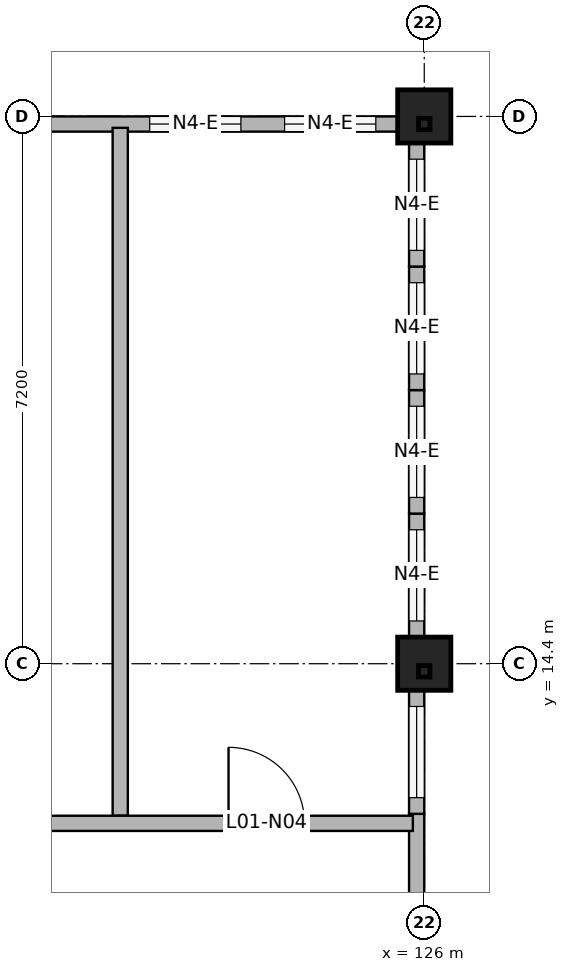
"""IFC4 building model, lengths in metres.
Left out: names, types, materials, properties, quantities, classifications, styles, units other than length and angle.
Written with IfcOpenShell. Run it as: python <this file> out.ifc"""

import sys

from ifc_helpers import new_model, si_unit, direction, frame, frame_2d, origin, origin_2d, place, context, subcontext, project, spatial, rectangle, hollow_rectangle, extrude, element, fill, save


model = new_model("IFC4")
c1 = context("Model", 3, precision=1e-05, world=origin(), true_north=direction((0.0, 1.0)))
c2 = subcontext(c1, "Body", "Model", "MODEL_VIEW")
j1 = project(units=[si_unit("LENGTHUNIT", "METRE"), si_unit("PLANEANGLEUNIT", "RADIAN")], contexts=[c1])
p1 = place(None, origin())
s1 = spatial("IfcSite", under=j1, at=p1, CompositionType="ELEMENT")
p2 = place(p1, origin())
s2 = spatial("IfcBuilding", under=s1, at=p2, CompositionType="ELEMENT")
p3 = place(p2, frame((0.0, 0.0, 4.2)))
s3 = spatial("IfcBuildingStorey", under=s2, at=p3, CompositionType="ELEMENT", Elevation=4.2)
for number, where, z_axis, x_axis in (
    (1, (126.0, 14.4, 0.0), (0.0, 0.0, 1.0), (1.0, 0.0, 0.0)),
    (2, (126.0, 21.6, 0.0), (0.0, 0.0, 1.0), (1.0, 0.0, 0.0)),
):
    element("IfcColumn", number, at=place(p3, frame(where, z_axis=z_axis, x_axis=x_axis)), inside=s3, PredefinedType="COLUMN", context=c2, shape_type="SweptSolid", body=[
        extrude(rectangle(XDim=0.7, YDim=0.7, at=origin_2d()), origin(), (0.0, 0.0, 1.0), 4.004),
    ])
for number, where, z_axis, x_axis in (
    (3, (126.0, 14.3, 4.004), (0.0, 0.0, 1.0), (1.0, 0.0, 0.0)),
    (4, (126.0, 21.5, 4.004), (0.0, 0.0, 1.0), (1.0, 0.0, 0.0)),
):
    element("IfcColumn", number, at=place(p3, frame(where, z_axis=z_axis, x_axis=x_axis)), inside=s3, PredefinedType="COLUMN", context=c2, shape_type="SweptSolid", body=[
        extrude(hollow_rectangle(XDim=0.15, YDim=0.15, WallThickness=0.008, at=origin_2d()), origin(), (0.0, 0.0, 1.0), 1.155),
    ])
p4 = place(p3, frame((120.35, 21.5, 0.0), z_axis=(0.0, 0.0, 1.0), x_axis=(1.0, 0.0, 0.0)))
e5 = element("IfcWall", 5, at=p4, inside=s3, PredefinedType="SOLIDWALL", context=c2, shape_type="SweptSolid", body=[
    extrude(rectangle(XDim=5.3, YDim=0.2, at=frame_2d((2.65, 0.0))), origin(), (0.0, 0.0, 1.0), 3.204),
])
p5 = place(p4, frame((2.038, 0.0, 1.2)))
e6 = element("IfcOpeningElement", 6, at=p5, cuts=e5, PredefinedType="OPENING", context=c2, shape_type="SweptSolid", body=[
    extrude(rectangle(XDim=1.2, YDim=1.4, at=frame_2d((0.6, 0.7))), frame((0.0, 0.11, 0.0), z_axis=(0.0, -1.0, 0.0), x_axis=(1.0, 0.0, 0.0)), (0.0, 0.0, 1.0), 0.22),
])
p6 = place(p4, frame((3.812, 0.0, 1.2)))
e7 = element("IfcOpeningElement", 7, at=p6, cuts=e5, PredefinedType="OPENING", context=c2, shape_type="SweptSolid", body=[
    extrude(rectangle(XDim=1.2, YDim=1.4, at=frame_2d((0.6, 0.7))), frame((0.0, 0.11, 0.0), z_axis=(0.0, -1.0, 0.0), x_axis=(1.0, 0.0, 0.0)), (0.0, 0.0, 1.0), 0.22),
])
p7 = place(p3, frame((125.9, 10.8, 0.0), z_axis=(0.0, 0.0, 1.0), x_axis=(0.0, 1.0, 0.0)))
e8 = element("IfcWall", 8, at=p7, inside=s3, PredefinedType="SOLIDWALL", context=c2, shape_type="SweptSolid", body=[
    extrude(rectangle(XDim=1.625, YDim=0.2, at=frame_2d((0.812, 0.0))), origin(), (0.0, 0.0, 1.0), 4.691),
])
p8 = place(p3, frame((125.9, 12.425, 0.0), z_axis=(0.0, 0.0, 1.0), x_axis=(0.0, 1.0, 0.0)))
e9 = element("IfcWall", 9, at=p8, inside=s3, PredefinedType="SOLIDWALL", context=c2, shape_type="SweptSolid", body=[
    extrude(rectangle(XDim=1.625, YDim=0.2, at=frame_2d((0.812, 0.0))), origin(), (0.0, 0.0, 1.0), 5.007),
])
p9 = place(p8, frame((0.212, 0.0, 1.2)))
e10 = element("IfcOpeningElement", 10, at=p9, cuts=e9, PredefinedType="OPENING", context=c2, shape_type="SweptSolid", body=[
    extrude(rectangle(XDim=1.2, YDim=1.4, at=frame_2d((0.6, 0.7))), frame((0.0, 0.11, 0.0), z_axis=(0.0, -1.0, 0.0), x_axis=(1.0, 0.0, 0.0)), (0.0, 0.0, 1.0), 0.22),
])
p10 = place(p3, frame((125.9, 14.75, 0.0), z_axis=(0.0, 0.0, 1.0), x_axis=(0.0, 1.0, 0.0)))
e11 = element("IfcWall", 11, at=p10, inside=s3, PredefinedType="SOLIDWALL", context=c2, shape_type="SweptSolid", body=[
    extrude(rectangle(XDim=1.625, YDim=0.2, at=frame_2d((0.812, 0.0))), origin(), (0.0, 0.0, 1.0), 4.059),
])
p11 = place(p10, frame((0.212, 0.0, 1.2)))
e12 = element("IfcOpeningElement", 12, at=p11, cuts=e11, PredefinedType="OPENING", context=c2, shape_type="SweptSolid", body=[
    extrude(rectangle(XDim=1.2, YDim=1.4, at=frame_2d((0.6, 0.7))), frame((0.0, 0.11, 0.0), z_axis=(0.0, -1.0, 0.0), x_axis=(1.0, 0.0, 0.0)), (0.0, 0.0, 1.0), 0.22),
])
p12 = place(p3, frame((125.9, 16.375, 0.0), z_axis=(0.0, 0.0, 1.0), x_axis=(0.0, 1.0, 0.0)))
e13 = element("IfcWall", 13, at=p12, inside=s3, PredefinedType="SOLIDWALL", context=c2, shape_type="SweptSolid", body=[
    extrude(rectangle(XDim=1.625, YDim=0.2, at=frame_2d((0.812, 0.0))), origin(), (0.0, 0.0, 1.0), 4.375),
])
p13 = place(p12, frame((0.212, 0.0, 1.2)))
e14 = element("IfcOpeningElement", 14, at=p13, cuts=e13, PredefinedType="OPENING", context=c2, shape_type="SweptSolid", body=[
    extrude(rectangle(XDim=1.2, YDim=1.4, at=frame_2d((0.6, 0.7))), frame((0.0, 0.11, 0.0), z_axis=(0.0, -1.0, 0.0), x_axis=(1.0, 0.0, 0.0)), (0.0, 0.0, 1.0), 0.22),
])
p14 = place(p3, frame((125.9, 18.0, 0.0), z_axis=(0.0, 0.0, 1.0), x_axis=(0.0, 1.0, 0.0)))
e15 = element("IfcWall", 15, at=p14, inside=s3, PredefinedType="SOLIDWALL", context=c2, shape_type="SweptSolid", body=[
    extrude(rectangle(XDim=1.625, YDim=0.2, at=frame_2d((0.812, 0.0))), origin(), (0.0, 0.0, 1.0), 4.691),
])
p15 = place(p14, frame((0.212, 0.0, 1.2)))
e16 = element("IfcOpeningElement", 16, at=p15, cuts=e15, PredefinedType="OPENING", context=c2, shape_type="SweptSolid", body=[
    extrude(rectangle(XDim=1.2, YDim=1.4, at=frame_2d((0.6, 0.7))), frame((0.0, 0.11, 0.0), z_axis=(0.0, -1.0, 0.0), x_axis=(1.0, 0.0, 0.0)), (0.0, 0.0, 1.0), 0.22),
])
p16 = place(p3, frame((125.9, 19.625, 0.0), z_axis=(0.0, 0.0, 1.0), x_axis=(0.0, 1.0, 0.0)))
e17 = element("IfcWall", 17, at=p16, inside=s3, PredefinedType="SOLIDWALL", context=c2, shape_type="SweptSolid", body=[
    extrude(rectangle(XDim=1.625, YDim=0.2, at=frame_2d((0.812, 0.0))), origin(), (0.0, 0.0, 1.0), 5.007),
])
p17 = place(p16, frame((0.212, 0.0, 1.2)))
e18 = element("IfcOpeningElement", 18, at=p17, cuts=e17, PredefinedType="OPENING", context=c2, shape_type="SweptSolid", body=[
    extrude(rectangle(XDim=1.2, YDim=1.4, at=frame_2d((0.6, 0.7))), frame((0.0, 0.11, 0.0), z_axis=(0.0, -1.0, 0.0), x_axis=(1.0, 0.0, 0.0)), (0.0, 0.0, 1.0), 0.22),
])
p18 = place(p3, frame((122.0, 12.4, 0.0), z_axis=(0.0, 0.0, 1.0), x_axis=(0.0, 1.0, 0.0)))
e19 = element("IfcWall", 19, at=p18, inside=s3, PredefinedType="PARTITIONING", context=c2, shape_type="SweptSolid", body=[
    extrude(rectangle(XDim=9.05, YDim=0.2, at=frame_2d((4.525, 0.0))), origin(), (0.0, 0.0, 1.0), 3.204),
])
p19 = place(p3, frame((108.15, 12.3, 0.0), z_axis=(0.0, 0.0, 1.0), x_axis=(1.0, 0.0, 0.0)))
e20 = element("IfcWall", 20, at=p19, inside=s3, PredefinedType="PARTITIONING", context=c2, shape_type="SweptSolid", body=[
    extrude(rectangle(XDim=17.7, YDim=0.2, at=frame_2d((8.85, 0.0))), origin(), (0.0, 0.0, 1.0), 3.95),
])
p20 = place(p19, frame((2.825, 0.0, 0.0)))
e21 = element("IfcOpeningElement", 21, at=p20, cuts=e20, PredefinedType="OPENING", context=c2, shape_type="SweptSolid", body=[
    extrude(rectangle(XDim=1.2, YDim=2.1, at=frame_2d((0.6, 1.05))), frame((0.0, 0.11, 0.0), z_axis=(0.0, -1.0, 0.0), x_axis=(1.0, 0.0, 0.0)), (0.0, 0.0, 1.0), 0.22),
])
p21 = place(p19, frame((9.75, 0.0, 0.0)))
e22 = element("IfcOpeningElement", 22, at=p21, cuts=e20, PredefinedType="OPENING", context=c2, shape_type="SweptSolid", body=[
    extrude(rectangle(XDim=1.2, YDim=2.1, at=frame_2d((0.6, 1.05))), frame((0.0, 0.11, 0.0), z_axis=(0.0, -1.0, 0.0), x_axis=(1.0, 0.0, 0.0)), (0.0, 0.0, 1.0), 0.22),
])
p22 = place(p19, frame((15.275, 0.0, 0.0)))
e23 = element("IfcOpeningElement", 23, at=p22, cuts=e20, PredefinedType="OPENING", context=c2, shape_type="SweptSolid", body=[
    extrude(rectangle(XDim=1.0, YDim=2.1, at=frame_2d((0.5, 1.05))), frame((0.0, 0.11, 0.0), z_axis=(0.0, -1.0, 0.0), x_axis=(1.0, 0.0, 0.0)), (0.0, 0.0, 1.0), 0.22),
])
p23 = place(p5, origin())
e24 = element("IfcWindow", 24, at=p23, inside=s3, PartitioningType="SINGLE_PANEL", PredefinedType="WINDOW", context=c2, shape_type="SweptSolid", body=[
    extrude(rectangle(XDim=1.2, YDim=1.4, at=frame_2d((0.6, 0.7))), frame((0.0, 0.03, 0.0), z_axis=(0.0, -1.0, 0.0), x_axis=(1.0, 0.0, 0.0)), (0.0, 0.0, 1.0), 0.06),
])
fill(e6, e24)
p24 = place(p6, origin())
e25 = element("IfcWindow", 25, at=p24, inside=s3, PartitioningType="SINGLE_PANEL", PredefinedType="WINDOW", context=c2, shape_type="SweptSolid", body=[
    extrude(rectangle(XDim=1.2, YDim=1.4, at=frame_2d((0.6, 0.7))), frame((0.0, 0.03, 0.0), z_axis=(0.0, -1.0, 0.0), x_axis=(1.0, 0.0, 0.0)), (0.0, 0.0, 1.0), 0.06),
])
fill(e7, e25)
p25 = place(p9, origin())
e26 = element("IfcWindow", 26, at=p25, inside=s3, PartitioningType="SINGLE_PANEL", PredefinedType="WINDOW", context=c2, shape_type="SweptSolid", body=[
    extrude(rectangle(XDim=1.2, YDim=1.4, at=frame_2d((0.6, 0.7))), frame((0.0, 0.03, 0.0), z_axis=(0.0, -1.0, 0.0), x_axis=(1.0, 0.0, 0.0)), (0.0, 0.0, 1.0), 0.06),
])
fill(e10, e26)
p26 = place(p11, origin())
e27 = element("IfcWindow", 27, at=p26, inside=s3, PartitioningType="SINGLE_PANEL", PredefinedType="WINDOW", context=c2, shape_type="SweptSolid", body=[
    extrude(rectangle(XDim=1.2, YDim=1.4, at=frame_2d((0.6, 0.7))), frame((0.0, 0.03, 0.0), z_axis=(0.0, -1.0, 0.0), x_axis=(1.0, 0.0, 0.0)), (0.0, 0.0, 1.0), 0.06),
])
fill(e12, e27)
p27 = place(p13, origin())
e28 = element("IfcWindow", 28, at=p27, inside=s3, PartitioningType="SINGLE_PANEL", PredefinedType="WINDOW", context=c2, shape_type="SweptSolid", body=[
    extrude(rectangle(XDim=1.2, YDim=1.4, at=frame_2d((0.6, 0.7))), frame((0.0, 0.03, 0.0), z_axis=(0.0, -1.0, 0.0), x_axis=(1.0, 0.0, 0.0)), (0.0, 0.0, 1.0), 0.06),
])
fill(e14, e28)
p28 = place(p15, origin())
e29 = element("IfcWindow", 29, at=p28, inside=s3, PartitioningType="SINGLE_PANEL", PredefinedType="WINDOW", context=c2, shape_type="SweptSolid", body=[
    extrude(rectangle(XDim=1.2, YDim=1.4, at=frame_2d((0.6, 0.7))), frame((0.0, 0.03, 0.0), z_axis=(0.0, -1.0, 0.0), x_axis=(1.0, 0.0, 0.0)), (0.0, 0.0, 1.0), 0.06),
])
fill(e16, e29)
p29 = place(p17, origin())
e30 = element("IfcWindow", 30, at=p29, inside=s3, PartitioningType="SINGLE_PANEL", PredefinedType="WINDOW", context=c2, shape_type="SweptSolid", body=[
    extrude(rectangle(XDim=1.2, YDim=1.4, at=frame_2d((0.6, 0.7))), frame((0.0, 0.03, 0.0), z_axis=(0.0, -1.0, 0.0), x_axis=(1.0, 0.0, 0.0)), (0.0, 0.0, 1.0), 0.06),
])
fill(e18, e30)
p30 = place(p22, origin())
e31 = element("IfcDoor", 31, at=p30, inside=s3, OperationType="SINGLE_SWING_LEFT", PredefinedType="DOOR", context=c2, shape_type="SweptSolid", body=[
    extrude(rectangle(XDim=1.0, YDim=2.1, at=frame_2d((0.5, 1.05))), frame((0.0, 0.025, 0.0), z_axis=(0.0, -1.0, 0.0), x_axis=(1.0, 0.0, 0.0)), (0.0, 0.0, 1.0), 0.05),
])
fill(e23, e31)
save(model, sys.argv[1])
